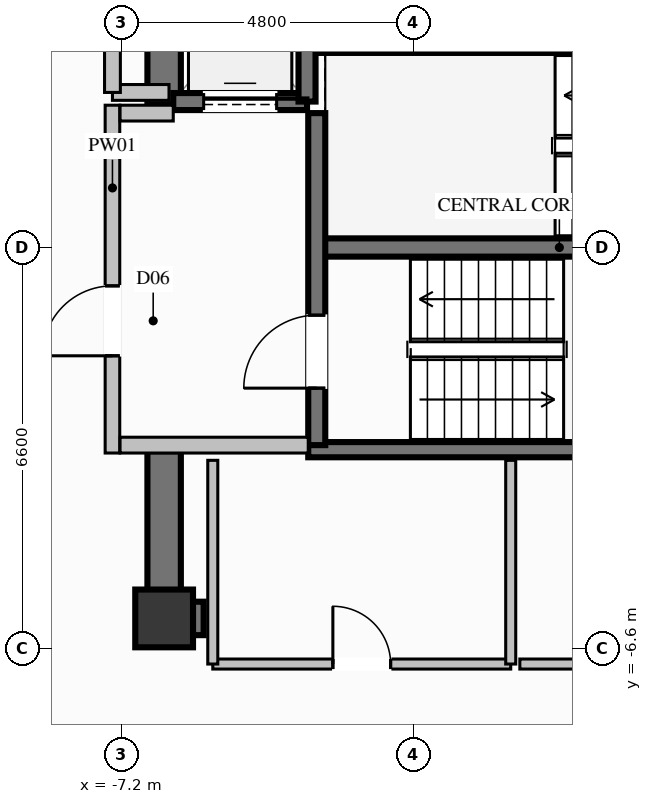
"""IFC4 building model, lengths in metres.
Left out: names, types, materials, properties, quantities, classifications, styles, units other than length and angle.
Written with IfcOpenShell. Run it as: python <this file> out.ifc"""

import sys

from ifc_helpers import new_model, si_unit, direction, frame, frame_2d, origin, origin_2d, place, context, subcontext, project, spatial, rectangle, extrude, element, fill, save


model = new_model("IFC4")
c1 = context("Model", 3, precision=1e-05, world=origin(), true_north=direction((0.0, 1.0)))
c2 = subcontext(c1, "Body", "Model", "MODEL_VIEW")
j1 = project(units=[si_unit("LENGTHUNIT", "METRE"), si_unit("PLANEANGLEUNIT", "RADIAN")], contexts=[c1])
p1 = place(None, origin())
s1 = spatial("IfcSite", under=j1, at=p1, CompositionType="ELEMENT")
p2 = place(p1, origin())
s2 = spatial("IfcBuilding", under=s1, at=p2, CompositionType="ELEMENT")
p3 = place(p2, frame((0.0, 0.0, 173.2)))
s3 = spatial("IfcBuildingStorey", under=s2, at=p3, CompositionType="ELEMENT", Elevation=173.2)
p4 = place(p3, frame((-6.5, -6.1, 0.0), z_axis=(0.0, 0.0, 1.0), x_axis=(1.0, 0.0, 0.0)))
e1 = element("IfcColumn", 1, at=p4, inside=s3, PredefinedType="COLUMN", context=c2, shape_type="SweptSolid", body=[
    extrude(rectangle(XDim=0.95, YDim=0.95, at=origin_2d()), origin(), (0.0, 0.0, 1.0), 3.6),
])
p5 = place(p3, frame((-3.99, 0.0, 0.0), z_axis=(0.0, 0.0, 1.0), x_axis=(1.0, 0.0, 0.0)))
e2 = element("IfcWall", 2, at=p5, inside=s3, PredefinedType="SHEAR", context=c2, shape_type="SweptSolid", body=[
    extrude(rectangle(XDim=7.98, YDim=0.3, at=frame_2d((3.99, 0.0))), origin(), (0.0, 0.0, 1.0), 3.6),
])
for number, where, z_axis, x_axis in (
    (3, (-4.13, -3.325, 0.0), (0.0, 0.0, 1.0), (1.0, 0.0, 0.0)),
    (4, (-4.13, 3.325, 0.0), (0.0, 0.0, 1.0), (1.0, 0.0, 0.0)),
):
    element("IfcWall", number, at=place(p3, frame(where, z_axis=z_axis, x_axis=x_axis)), inside=s3, PredefinedType="SOLIDWALL", context=c2, shape_type="SweptSolid", body=[
        extrude(rectangle(XDim=8.26, YDim=0.25, at=frame_2d((4.13, 0.0))), origin(), (0.0, 0.0, 1.0), 3.6),
    ])
p6 = place(p3, frame((-6.225, -6.1, 0.0), z_axis=(0.0, 0.0, 1.0), x_axis=(1.0, 0.0, 0.0)))
e5 = element("IfcWall", 5, at=p6, inside=s3, PredefinedType="SHEAR", context=c2, shape_type="SweptSolid", body=[
    extrude(rectangle(XDim=0.375, YDim=0.55, at=frame_2d((0.188, 0.0))), origin(), (0.0, 0.0, 1.0), 3.6),
])
p7 = place(p3, frame((-6.5, 2.35, 0.0), z_axis=(0.0, 0.0, 1.0), x_axis=(0.0, 1.0, 0.0)))
e6 = element("IfcWall", 6, at=p7, inside=s3, PredefinedType="SHEAR", context=c2, shape_type="SweptSolid", body=[
    extrude(rectangle(XDim=4.025, YDim=0.55, at=frame_2d((2.012, 0.0))), origin(), (0.0, 0.0, 1.0), 3.6),
])
p8 = place(p3, frame((-6.5, -6.375, 0.0), z_axis=(0.0, 0.0, 1.0), x_axis=(0.0, 1.0, 0.0)))
e7 = element("IfcWall", 7, at=p8, inside=s3, PredefinedType="SHEAR", context=c2, shape_type="SweptSolid", body=[
    extrude(rectangle(XDim=3.025, YDim=0.55, at=frame_2d((1.512, 0.0))), origin(), (0.0, 0.0, 1.0), 3.6),
])
p9 = place(p3, frame((-6.35, 2.4, 0.0), z_axis=(0.0, 0.0, 1.0), x_axis=(1.0, 0.0, 0.0)))
e8 = element("IfcWall", 8, at=p9, inside=s3, PredefinedType="SOLIDWALL", context=c2, shape_type="SweptSolid", body=[
    extrude(rectangle(XDim=2.2, YDim=0.28, at=frame_2d((1.1, 0.0))), origin(), (0.0, 0.0, 1.0), 3.36),
])
p10 = place(p9, frame((0.5, 0.0, 0.0)))
e9 = element("IfcOpeningElement", 9, at=p10, cuts=e8, PredefinedType="OPENING", context=c2, shape_type="SweptSolid", body=[
    extrude(rectangle(XDim=1.2, YDim=2.2, at=frame_2d((0.6, 1.1))), frame((0.0, 0.15, 0.0), z_axis=(0.0, -1.0, 0.0), x_axis=(1.0, 0.0, 0.0)), (0.0, 0.0, 1.0), 0.3),
])
p11 = place(p3, frame((-4.15, 2.4, 0.0), z_axis=(0.0, 0.0, 1.0), x_axis=(0.0, 1.0, 0.0)))
e10 = element("IfcWall", 10, at=p11, inside=s3, PredefinedType="SOLIDWALL", context=c2, shape_type="SweptSolid", body=[
    extrude(rectangle(XDim=2.7, YDim=0.28, at=frame_2d((1.35, 0.0))), origin(), (0.0, 0.0, 1.0), 3.36),
])
p12 = place(p3, frame((-3.99, -3.25, 0.0), z_axis=(0.0, 0.0, 1.0), x_axis=(0.0, 1.0, 0.0)))
e11 = element("IfcWall", 11, at=p12, inside=s3, PredefinedType="SOLIDWALL", context=c2, shape_type="SweptSolid", body=[
    extrude(rectangle(XDim=5.46, YDim=0.28, at=frame_2d((2.73, 0.0))), origin(), (0.0, 0.0, 1.0), 3.36),
])
p13 = place(p12, frame((0.937, 0.0, 0.0)))
e12 = element("IfcOpeningElement", 12, at=p13, cuts=e11, PredefinedType="OPENING", context=c2, shape_type="SweptSolid", body=[
    extrude(rectangle(XDim=1.2, YDim=2.2, at=frame_2d((0.6, 1.1))), frame((0.0, 0.15, 0.0), z_axis=(0.0, -1.0, 0.0), x_axis=(1.0, 0.0, 0.0)), (0.0, 0.0, 1.0), 0.3),
])
p14 = place(p3, frame((-7.35, -3.38, 0.0), z_axis=(0.0, 0.0, 1.0), x_axis=(0.0, 1.0, 0.0)))
e13 = element("IfcWall", 13, at=p14, inside=s3, PredefinedType="PARTITIONING", context=c2, shape_type="SweptSolid", body=[
    extrude(rectangle(XDim=5.72, YDim=0.24, at=frame_2d((2.86, 0.0))), origin(), (0.0, 0.0, 1.0), 2.445),
])
p15 = place(p14, frame((1.599, 0.0, 0.0)))
e14 = element("IfcOpeningElement", 14, at=p15, cuts=e13, PredefinedType="OPENING", context=c2, shape_type="SweptSolid", body=[
    extrude(rectangle(XDim=1.15, YDim=2.2, at=frame_2d((0.575, 1.1))), frame((0.0, 0.13, 0.0), z_axis=(0.0, -1.0, 0.0), x_axis=(1.0, 0.0, 0.0)), (0.0, 0.0, 1.0), 0.26),
])
p16 = place(p3, frame((-7.225, -3.25, 0.0), z_axis=(0.0, 0.0, 1.0), x_axis=(1.0, 0.0, 0.0)))
e15 = element("IfcWall", 15, at=p16, inside=s3, PredefinedType="PARTITIONING", context=c2, shape_type="SweptSolid", body=[
    extrude(rectangle(XDim=3.095, YDim=0.26, at=frame_2d((1.548, 0.0))), origin(), (0.0, 0.0, 1.0), 3.36),
])
p17 = place(p3, frame((-7.225, 2.21, 0.0), z_axis=(0.0, 0.0, 1.0), x_axis=(1.0, 0.0, 0.0)))
e16 = element("IfcWall", 16, at=p17, inside=s3, PredefinedType="PARTITIONING", context=c2, shape_type="SweptSolid", body=[
    extrude(rectangle(XDim=0.875, YDim=0.26, at=frame_2d((0.438, 0.0))), origin(), (0.0, 0.0, 1.0), 3.36),
])
p18 = place(p3, frame((-7.35, 2.55, 0.0), z_axis=(0.0, 0.0, 1.0), x_axis=(1.0, 0.0, 0.0)))
e17 = element("IfcWall", 17, at=p18, inside=s3, PredefinedType="PARTITIONING", context=c2, shape_type="SweptSolid", body=[
    extrude(rectangle(XDim=0.93, YDim=0.26, at=frame_2d((0.465, 0.0))), origin(), (0.0, 0.0, 1.0), 3.36),
])
p19 = place(p3, frame((-7.35, 2.55, 0.0), z_axis=(0.0, 0.0, 1.0), x_axis=(0.0, 1.0, 0.0)))
e18 = element("IfcWall", 18, at=p19, inside=s3, PredefinedType="PARTITIONING", context=c2, shape_type="SweptSolid", body=[
    extrude(rectangle(XDim=2.4, YDim=0.26, at=frame_2d((1.2, 0.0))), origin(), (0.0, 0.0, 1.0), 2.445),
])
p20 = place(p19, frame((0.775, 0.0, 0.0)))
e19 = element("IfcOpeningElement", 19, at=p20, cuts=e18, PredefinedType="OPENING", context=c2, shape_type="SweptSolid", body=[
    extrude(rectangle(XDim=0.85, YDim=2.05, at=frame_2d((0.425, 1.025))), frame((0.0, 0.14, 0.0), z_axis=(0.0, -1.0, 0.0), x_axis=(1.0, 0.0, 0.0)), (0.0, 0.0, 1.0), 0.28),
])
p21 = place(p3, frame((-5.7, -6.85, 0.0), z_axis=(0.0, 0.0, 1.0), x_axis=(1.0, 0.0, 0.0)))
e20 = element("IfcWall", 20, at=p21, inside=s3, PredefinedType="PARTITIONING", context=c2, shape_type="SweptSolid", body=[
    extrude(rectangle(XDim=4.9, YDim=0.165, at=frame_2d((2.45, 0.0))), origin(), (0.0, 0.0, 1.0), 2.445),
])
p22 = place(p21, frame((1.975, 0.0, 0.0)))
e21 = element("IfcOpeningElement", 21, at=p22, cuts=e20, PredefinedType="OPENING", context=c2, shape_type="SweptSolid", body=[
    extrude(rectangle(XDim=0.95, YDim=2.1, at=frame_2d((0.475, 1.05))), frame((0.0, 0.093, 0.0), z_axis=(0.0, -1.0, 0.0), x_axis=(1.0, 0.0, 0.0)), (0.0, 0.0, 1.0), 0.185),
])
p23 = place(p3, frame((-0.8, -6.85, 0.0), z_axis=(0.0, 0.0, 1.0), x_axis=(0.0, 1.0, 0.0)))
e22 = element("IfcWall", 22, at=p23, inside=s3, PredefinedType="PARTITIONING", context=c2, shape_type="SweptSolid", body=[
    extrude(rectangle(XDim=3.35, YDim=0.165, at=frame_2d((1.675, 0.0))), origin(), (0.0, 0.0, 1.0), 3.36),
])
p24 = place(p3, frame((-5.7, -3.5, 0.0), z_axis=(0.0, 0.0, 1.0), x_axis=(0.0, -1.0, 0.0)))
e23 = element("IfcWall", 23, at=p24, inside=s3, PredefinedType="PARTITIONING", context=c2, shape_type="SweptSolid", body=[
    extrude(rectangle(XDim=3.35, YDim=0.165, at=frame_2d((1.675, 0.0))), origin(), (0.0, 0.0, 1.0), 2.445),
])
p25 = place(p3, frame((-0.65, -6.85, 0.0), z_axis=(0.0, 0.0, 1.0), x_axis=(1.0, 0.0, 0.0)))
e24 = element("IfcWall", 24, at=p25, inside=s3, PredefinedType="PARTITIONING", context=c2, shape_type="SweptSolid", body=[
    extrude(rectangle(XDim=4.6, YDim=0.165, at=frame_2d((2.3, 0.0))), origin(), (0.0, 0.0, 1.0), 2.445),
])
p26 = place(p25, frame((1.825, 0.0, 0.0)))
e25 = element("IfcOpeningElement", 25, at=p26, cuts=e24, PredefinedType="OPENING", context=c2, shape_type="SweptSolid", body=[
    extrude(rectangle(XDim=0.95, YDim=2.1, at=frame_2d((0.475, 1.05))), frame((0.0, 0.093, 0.0), z_axis=(0.0, -1.0, 0.0), x_axis=(1.0, 0.0, 0.0)), (0.0, 0.0, 1.0), 0.185),
])
p27 = place(p10, origin())
e26 = element("IfcDoor", 26, at=p27, inside=s3, OperationType="SLIDING_TO_LEFT", PredefinedType="DOOR", context=c2, shape_type="SweptSolid", body=[
    extrude(rectangle(XDim=1.2, YDim=2.2, at=frame_2d((0.6, 1.1))), frame((0.0, 0.025, 0.0), z_axis=(0.0, -1.0, 0.0), x_axis=(1.0, 0.0, 0.0)), (0.0, 0.0, 1.0), 0.05),
])
fill(e9, e26)
p28 = place(p13, origin())
e27 = element("IfcDoor", 27, at=p28, inside=s3, OperationType="SINGLE_SWING_LEFT", PredefinedType="DOOR", context=c2, shape_type="SweptSolid", body=[
    extrude(rectangle(XDim=1.2, YDim=2.2, at=frame_2d((0.6, 1.1))), frame((0.0, 0.025, 0.0), z_axis=(0.0, -1.0, 0.0), x_axis=(1.0, 0.0, 0.0)), (0.0, 0.0, 1.0), 0.05),
])
fill(e12, e27)
p29 = place(p15, origin())
e28 = element("IfcDoor", 28, at=p29, inside=s3, OperationType="SINGLE_SWING_LEFT", PredefinedType="DOOR", context=c2, shape_type="SweptSolid", body=[
    extrude(rectangle(XDim=1.15, YDim=2.2, at=frame_2d((0.575, 1.1))), frame((0.0, 0.025, 0.0), z_axis=(0.0, -1.0, 0.0), x_axis=(1.0, 0.0, 0.0)), (0.0, 0.0, 1.0), 0.05),
])
fill(e14, e28)
p30 = place(p22, origin())
e29 = element("IfcDoor", 29, at=p30, inside=s3, OperationType="SINGLE_SWING_LEFT", PredefinedType="DOOR", context=c2, shape_type="SweptSolid", body=[
    extrude(rectangle(XDim=0.95, YDim=2.1, at=frame_2d((0.475, 1.05))), frame((0.0, 0.025, 0.0), z_axis=(0.0, -1.0, 0.0), x_axis=(1.0, 0.0, 0.0)), (0.0, 0.0, 1.0), 0.05),
])
fill(e21, e29)
save(model, sys.argv[1])
